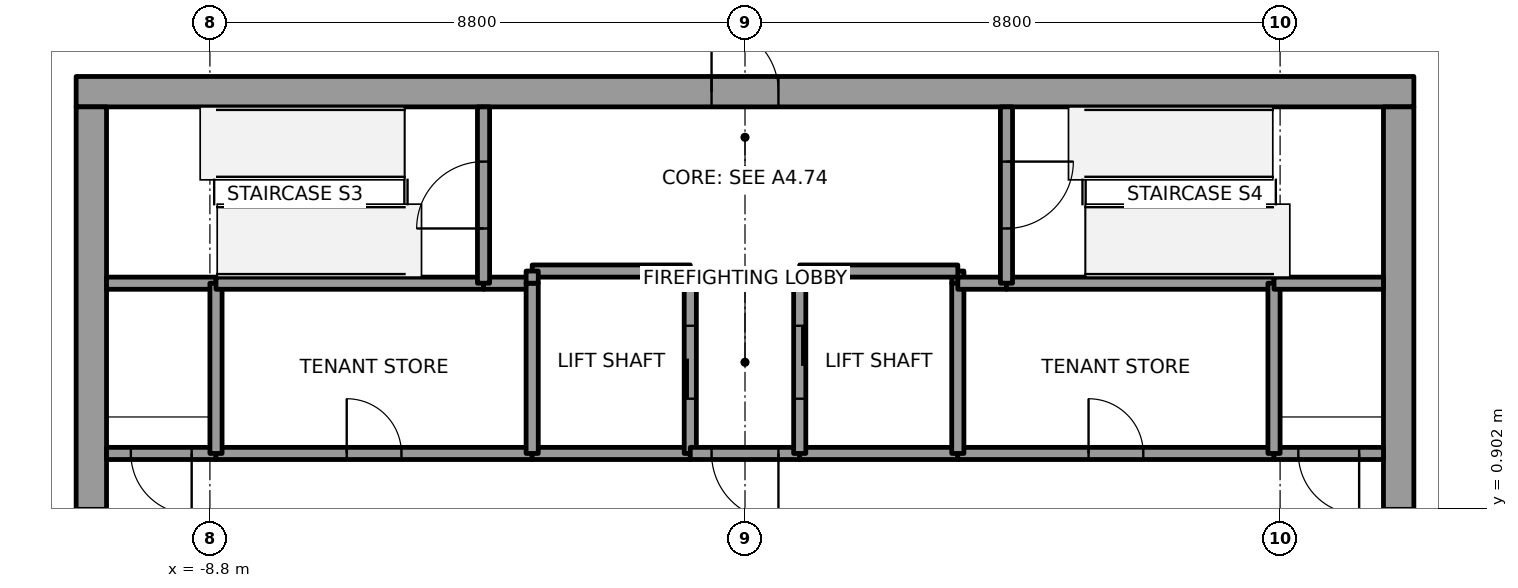
"""IFC4 building model, lengths in metres.
Left out: names, types, materials, properties, quantities, classifications, styles, units other than length and angle.
Written with IfcOpenShell. Run it as: python <this file> out.ifc"""

import sys

from ifc_helpers import new_model, si_unit, direction, frame, frame_2d, origin, place, context, subcontext, project, spatial, rectangle, extrude, element, fill, save


model = new_model("IFC4")
c1 = context("Model", 3, precision=1e-05, world=origin(), true_north=direction((0.0, 1.0)))
c2 = subcontext(c1, "Body", "Model", "MODEL_VIEW")
j1 = project(units=[si_unit("LENGTHUNIT", "METRE"), si_unit("PLANEANGLEUNIT", "RADIAN")], contexts=[c1])
p1 = place(None, origin())
s1 = spatial("IfcSite", under=j1, at=p1, CompositionType="ELEMENT")
p2 = place(p1, origin())
s2 = spatial("IfcBuilding", under=s1, at=p2, CompositionType="ELEMENT")
p3 = place(p2, frame((0.0, 0.0, 315.0)))
s3 = spatial("IfcBuildingStorey", under=s2, at=p3, CompositionType="ELEMENT", Elevation=315.0)
p4 = place(p3, frame((-11.0, 7.75, 0.0), z_axis=(0.0, 0.0, 1.0), x_axis=(1.0, 0.0, 0.0)))
e1 = element("IfcWall", 1, at=p4, inside=s3, PredefinedType="SHEAR", context=c2, shape_type="SweptSolid", body=[
    extrude(rectangle(XDim=22.0, YDim=0.5, at=frame_2d((11.0, 0.0))), origin(), (0.0, 0.0, 1.0), 4.0),
])
p5 = place(p4, frame((10.45, 0.0, 0.0)))
e2 = element("IfcOpeningElement", 2, at=p5, cuts=e1, PredefinedType="OPENING", context=c2, shape_type="SweptSolid", body=[
    extrude(rectangle(XDim=1.1, YDim=2.1, at=frame_2d((0.55, 1.05))), frame((0.0, 0.25, 0.0), z_axis=(0.0, -1.0, 0.0), x_axis=(1.0, 0.0, 0.0)), (0.0, 0.0, 1.0), 0.5),
])
p6 = place(p3, frame((-10.75, -7.5, 0.0), z_axis=(0.0, 0.0, 1.0), x_axis=(0.0, 1.0, 0.0)))
e3 = element("IfcWall", 3, at=p6, inside=s3, PredefinedType="SHEAR", context=c2, shape_type="SweptSolid", body=[
    extrude(rectangle(XDim=15.0, YDim=0.5, at=frame_2d((7.5, 0.0))), origin(), (0.0, 0.0, 1.0), 4.0),
])
p7 = place(p6, frame((6.6, 0.0, 0.0)))
e4 = element("IfcOpeningElement", 4, at=p7, cuts=e3, PredefinedType="OPENING", context=c2, shape_type="SweptSolid", body=[
    extrude(rectangle(XDim=1.8, YDim=2.1, at=frame_2d((0.9, 1.05))), frame((0.0, 0.25, 0.0), z_axis=(0.0, -1.0, 0.0), x_axis=(1.0, 0.0, 0.0)), (0.0, 0.0, 1.0), 0.5),
])
p8 = place(p3, frame((10.75, -7.5, 0.0), z_axis=(0.0, 0.0, 1.0), x_axis=(0.0, 1.0, 0.0)))
e5 = element("IfcWall", 5, at=p8, inside=s3, PredefinedType="SHEAR", context=c2, shape_type="SweptSolid", body=[
    extrude(rectangle(XDim=15.0, YDim=0.5, at=frame_2d((7.5, 0.0))), origin(), (0.0, 0.0, 1.0), 4.0),
])
p9 = place(p8, frame((6.6, 0.0, 0.0)))
e6 = element("IfcOpeningElement", 6, at=p9, cuts=e5, PredefinedType="OPENING", context=c2, shape_type="SweptSolid", body=[
    extrude(rectangle(XDim=1.8, YDim=2.1, at=frame_2d((0.9, 1.05))), frame((0.0, 0.25, 0.0), z_axis=(0.0, -1.0, 0.0), x_axis=(1.0, 0.0, 0.0)), (0.0, 0.0, 1.0), 0.5),
])
p10 = place(p3, frame((-8.7, 1.8, 0.0), z_axis=(0.0, 0.0, 1.0), x_axis=(-1.0, 0.0, 0.0)))
e7 = element("IfcWall", 7, at=p10, inside=s3, PredefinedType="SOLIDWALL", context=c2, shape_type="SweptSolid", body=[
    extrude(rectangle(XDim=1.8, YDim=0.2, at=frame_2d((0.9, 0.0))), origin(), (0.0, 0.0, 1.0), 3.85),
])
p11 = place(p10, frame((0.4, 0.0, 0.0)))
e8 = element("IfcOpeningElement", 8, at=p11, cuts=e7, PredefinedType="OPENING", context=c2, shape_type="SweptSolid", body=[
    extrude(rectangle(XDim=1.0, YDim=2.1, at=frame_2d((0.5, 1.05))), frame((0.0, 0.1, 0.0), z_axis=(0.0, -1.0, 0.0), x_axis=(1.0, 0.0, 0.0)), (0.0, 0.0, 1.0), 0.2),
])
p12 = place(p3, frame((-8.7, 4.6, 0.0), z_axis=(0.0, 0.0, 1.0), x_axis=(-1.0, 0.0, 0.0)))
e9 = element("IfcWall", 9, at=p12, inside=s3, PredefinedType="SOLIDWALL", context=c2, shape_type="SweptSolid", body=[
    extrude(rectangle(XDim=1.8, YDim=0.2, at=frame_2d((0.9, 0.0))), origin(), (0.0, 0.0, 1.0), 3.85),
])
p13 = place(p3, frame((-8.7, 1.8, 0.0), z_axis=(0.0, 0.0, 1.0), x_axis=(1.0, 0.0, 0.0)))
e10 = element("IfcWall", 10, at=p13, inside=s3, PredefinedType="SOLIDWALL", context=c2, shape_type="SweptSolid", body=[
    extrude(rectangle(XDim=5.2, YDim=0.2, at=frame_2d((2.6, 0.0))), origin(), (0.0, 0.0, 1.0), 3.85),
])
p14 = place(p13, frame((2.15, 0.0, 0.0)))
e11 = element("IfcOpeningElement", 11, at=p14, cuts=e10, PredefinedType="OPENING", context=c2, shape_type="SweptSolid", body=[
    extrude(rectangle(XDim=0.9, YDim=2.1, at=frame_2d((0.45, 1.05))), frame((0.0, 0.1, 0.0), z_axis=(0.0, -1.0, 0.0), x_axis=(1.0, 0.0, 0.0)), (0.0, 0.0, 1.0), 0.2),
])
p15 = place(p3, frame((-8.7, 4.6, 0.0), z_axis=(0.0, 0.0, 1.0), x_axis=(0.0, -1.0, 0.0)))
e12 = element("IfcWall", 12, at=p15, inside=s3, PredefinedType="SOLIDWALL", context=c2, shape_type="SweptSolid", body=[
    extrude(rectangle(XDim=2.8, YDim=0.2, at=frame_2d((1.4, 0.0))), origin(), (0.0, 0.0, 1.0), 3.85),
])
p16 = place(p3, frame((-4.3, 4.6, 0.0), z_axis=(0.0, 0.0, 1.0), x_axis=(-1.0, 0.0, 0.0)))
e13 = element("IfcWall", 13, at=p16, inside=s3, PredefinedType="SOLIDWALL", context=c2, shape_type="SweptSolid", body=[
    extrude(rectangle(XDim=4.4, YDim=0.2, at=frame_2d((2.2, 0.0))), origin(), (0.0, 0.0, 1.0), 3.85),
])
p17 = place(p3, frame((-3.5, 4.6, 0.0), z_axis=(0.0, 0.0, 1.0), x_axis=(-1.0, 0.0, 0.0)))
e14 = element("IfcWall", 14, at=p17, inside=s3, PredefinedType="SOLIDWALL", context=c2, shape_type="SweptSolid", body=[
    extrude(rectangle(XDim=0.8, YDim=0.2, at=frame_2d((0.4, 0.0))), origin(), (0.0, 0.0, 1.0), 3.85),
])
p18 = place(p3, frame((-4.3, 4.6, 0.0), z_axis=(0.0, 0.0, 1.0), x_axis=(0.0, 1.0, 0.0)))
e15 = element("IfcWall", 15, at=p18, inside=s3, PredefinedType="SOLIDWALL", context=c2, shape_type="SweptSolid", body=[
    extrude(rectangle(XDim=2.9, YDim=0.2, at=frame_2d((1.45, 0.0))), origin(), (0.0, 0.0, 1.0), 3.85),
])
p19 = place(p18, frame((0.9, 0.0, 0.0)))
e16 = element("IfcOpeningElement", 16, at=p19, cuts=e15, PredefinedType="OPENING", context=c2, shape_type="SweptSolid", body=[
    extrude(rectangle(XDim=1.1, YDim=2.1, at=frame_2d((0.55, 1.05))), frame((0.0, 0.1, 0.0), z_axis=(0.0, -1.0, 0.0), x_axis=(1.0, 0.0, 0.0)), (0.0, 0.0, 1.0), 0.2),
])
p20 = place(p3, frame((-0.9, 1.8, 0.0), z_axis=(0.0, 0.0, 1.0), x_axis=(-1.0, 0.0, 0.0)))
e17 = element("IfcWall", 17, at=p20, inside=s3, PredefinedType="SOLIDWALL", context=c2, shape_type="SweptSolid", body=[
    extrude(rectangle(XDim=2.6, YDim=0.2, at=frame_2d((1.3, 0.0))), origin(), (0.0, 0.0, 1.0), 3.85),
])
p21 = place(p3, frame((-3.5, 1.8, 0.0), z_axis=(0.0, 0.0, 1.0), x_axis=(0.0, 1.0, 0.0)))
e18 = element("IfcWall", 18, at=p21, inside=s3, PredefinedType="SOLIDWALL", context=c2, shape_type="SweptSolid", body=[
    extrude(rectangle(XDim=2.8, YDim=0.2, at=frame_2d((1.4, 0.0))), origin(), (0.0, 0.0, 1.0), 3.85),
])
p22 = place(p3, frame((-0.9, 1.8, 0.0), z_axis=(0.0, 0.0, 1.0), x_axis=(0.0, 1.0, 0.0)))
e19 = element("IfcWall", 19, at=p22, inside=s3, PredefinedType="SOLIDWALL", context=c2, shape_type="SweptSolid", body=[
    extrude(rectangle(XDim=3.0, YDim=0.2, at=frame_2d((1.5, 0.0))), origin(), (0.0, 0.0, 1.0), 3.85),
])
p23 = place(p22, frame((0.9, 0.0, 0.0)))
e20 = element("IfcOpeningElement", 20, at=p23, cuts=e19, PredefinedType="OPENING", context=c2, shape_type="SweptSolid", body=[
    extrude(rectangle(XDim=1.2, YDim=2.1, at=frame_2d((0.6, 1.05))), frame((0.0, 0.1, 0.0), z_axis=(0.0, -1.0, 0.0), x_axis=(1.0, 0.0, 0.0)), (0.0, 0.0, 1.0), 0.2),
])
p24 = place(p3, frame((-0.9, 4.8, 0.0), z_axis=(0.0, 0.0, 1.0), x_axis=(-1.0, 0.0, 0.0)))
e21 = element("IfcWall", 21, at=p24, inside=s3, PredefinedType="SOLIDWALL", context=c2, shape_type="SweptSolid", body=[
    extrude(rectangle(XDim=2.6, YDim=0.2, at=frame_2d((1.3, 0.0))), origin(), (0.0, 0.0, 1.0), 3.85),
])
p25 = place(p3, frame((-3.5, 4.8, 0.0), z_axis=(0.0, 0.0, 1.0), x_axis=(0.0, -1.0, 0.0)))
e22 = element("IfcWall", 22, at=p25, inside=s3, PredefinedType="SOLIDWALL", context=c2, shape_type="SweptSolid", body=[
    extrude(rectangle(XDim=0.2, YDim=0.2, at=frame_2d((0.1, 0.0))), origin(), (0.0, 0.0, 1.0), 3.85),
])
p26 = place(p3, frame((0.9, 1.8, 0.0), z_axis=(0.0, 0.0, 1.0), x_axis=(-1.0, 0.0, 0.0)))
e23 = element("IfcWall", 23, at=p26, inside=s3, PredefinedType="SOLIDWALL", context=c2, shape_type="SweptSolid", body=[
    extrude(rectangle(XDim=1.8, YDim=0.2, at=frame_2d((0.9, 0.0))), origin(), (0.0, 0.0, 1.0), 3.85),
])
p27 = place(p26, frame((0.35, 0.0, 0.0)))
e24 = element("IfcOpeningElement", 24, at=p27, cuts=e23, PredefinedType="OPENING", context=c2, shape_type="SweptSolid", body=[
    extrude(rectangle(XDim=1.1, YDim=2.1, at=frame_2d((0.55, 1.05))), frame((0.0, 0.1, 0.0), z_axis=(0.0, -1.0, 0.0), x_axis=(1.0, 0.0, 0.0)), (0.0, 0.0, 1.0), 0.2),
])
p28 = place(p3, frame((3.5, 1.8, 0.0), z_axis=(0.0, 0.0, 1.0), x_axis=(-1.0, 0.0, 0.0)))
e25 = element("IfcWall", 25, at=p28, inside=s3, PredefinedType="SOLIDWALL", context=c2, shape_type="SweptSolid", body=[
    extrude(rectangle(XDim=2.6, YDim=0.2, at=frame_2d((1.3, 0.0))), origin(), (0.0, 0.0, 1.0), 3.85),
])
p29 = place(p3, frame((3.5, 4.6, 0.0), z_axis=(0.0, 0.0, 1.0), x_axis=(0.0, 1.0, 0.0)))
e26 = element("IfcWall", 26, at=p29, inside=s3, PredefinedType="SOLIDWALL", context=c2, shape_type="SweptSolid", body=[
    extrude(rectangle(XDim=0.2, YDim=0.2, at=frame_2d((0.1, 0.0))), origin(), (0.0, 0.0, 1.0), 3.85),
])
p30 = place(p3, frame((3.5, 4.8, 0.0), z_axis=(0.0, 0.0, 1.0), x_axis=(-1.0, 0.0, 0.0)))
e27 = element("IfcWall", 27, at=p30, inside=s3, PredefinedType="SOLIDWALL", context=c2, shape_type="SweptSolid", body=[
    extrude(rectangle(XDim=2.6, YDim=0.2, at=frame_2d((1.3, 0.0))), origin(), (0.0, 0.0, 1.0), 3.85),
])
p31 = place(p3, frame((0.9, 4.8, 0.0), z_axis=(0.0, 0.0, 1.0), x_axis=(0.0, -1.0, 0.0)))
e28 = element("IfcWall", 28, at=p31, inside=s3, PredefinedType="SOLIDWALL", context=c2, shape_type="SweptSolid", body=[
    extrude(rectangle(XDim=3.0, YDim=0.2, at=frame_2d((1.5, 0.0))), origin(), (0.0, 0.0, 1.0), 3.85),
])
p32 = place(p31, frame((0.9, 0.0, 0.0)))
e29 = element("IfcOpeningElement", 29, at=p32, cuts=e28, PredefinedType="OPENING", context=c2, shape_type="SweptSolid", body=[
    extrude(rectangle(XDim=1.2, YDim=2.1, at=frame_2d((0.6, 1.05))), frame((0.0, 0.1, 0.0), z_axis=(0.0, -1.0, 0.0), x_axis=(1.0, 0.0, 0.0)), (0.0, 0.0, 1.0), 0.2),
])
p33 = place(p3, frame((3.5, 1.8, 0.0), z_axis=(0.0, 0.0, 1.0), x_axis=(1.0, 0.0, 0.0)))
e30 = element("IfcWall", 30, at=p33, inside=s3, PredefinedType="SOLIDWALL", context=c2, shape_type="SweptSolid", body=[
    extrude(rectangle(XDim=5.2, YDim=0.2, at=frame_2d((2.6, 0.0))), origin(), (0.0, 0.0, 1.0), 3.85),
])
p34 = place(p33, frame((2.15, 0.0, 0.0)))
e31 = element("IfcOpeningElement", 31, at=p34, cuts=e30, PredefinedType="OPENING", context=c2, shape_type="SweptSolid", body=[
    extrude(rectangle(XDim=0.9, YDim=2.1, at=frame_2d((0.45, 1.05))), frame((0.0, 0.1, 0.0), z_axis=(0.0, -1.0, 0.0), x_axis=(1.0, 0.0, 0.0)), (0.0, 0.0, 1.0), 0.2),
])
p35 = place(p3, frame((3.5, 4.6, 0.0), z_axis=(0.0, 0.0, 1.0), x_axis=(0.0, -1.0, 0.0)))
e32 = element("IfcWall", 32, at=p35, inside=s3, PredefinedType="SOLIDWALL", context=c2, shape_type="SweptSolid", body=[
    extrude(rectangle(XDim=2.8, YDim=0.2, at=frame_2d((1.4, 0.0))), origin(), (0.0, 0.0, 1.0), 3.85),
])
p36 = place(p3, frame((4.3, 4.6, 0.0), z_axis=(0.0, 0.0, 1.0), x_axis=(-1.0, 0.0, 0.0)))
e33 = element("IfcWall", 33, at=p36, inside=s3, PredefinedType="SOLIDWALL", context=c2, shape_type="SweptSolid", body=[
    extrude(rectangle(XDim=0.8, YDim=0.2, at=frame_2d((0.4, 0.0))), origin(), (0.0, 0.0, 1.0), 3.85),
])
p37 = place(p3, frame((8.7, 4.6, 0.0), z_axis=(0.0, 0.0, 1.0), x_axis=(-1.0, 0.0, 0.0)))
e34 = element("IfcWall", 34, at=p37, inside=s3, PredefinedType="SOLIDWALL", context=c2, shape_type="SweptSolid", body=[
    extrude(rectangle(XDim=4.4, YDim=0.2, at=frame_2d((2.2, 0.0))), origin(), (0.0, 0.0, 1.0), 3.85),
])
p38 = place(p3, frame((4.3, 7.5, 0.0), z_axis=(0.0, 0.0, 1.0), x_axis=(0.0, -1.0, 0.0)))
e35 = element("IfcWall", 35, at=p38, inside=s3, PredefinedType="SOLIDWALL", context=c2, shape_type="SweptSolid", body=[
    extrude(rectangle(XDim=2.9, YDim=0.2, at=frame_2d((1.45, 0.0))), origin(), (0.0, 0.0, 1.0), 3.85),
])
p39 = place(p38, frame((0.9, 0.0, 0.0)))
e36 = element("IfcOpeningElement", 36, at=p39, cuts=e35, PredefinedType="OPENING", context=c2, shape_type="SweptSolid", body=[
    extrude(rectangle(XDim=1.1, YDim=2.1, at=frame_2d((0.55, 1.05))), frame((0.0, 0.1, 0.0), z_axis=(0.0, -1.0, 0.0), x_axis=(1.0, 0.0, 0.0)), (0.0, 0.0, 1.0), 0.2),
])
p40 = place(p3, frame((10.5, 1.8, 0.0), z_axis=(0.0, 0.0, 1.0), x_axis=(-1.0, 0.0, 0.0)))
e37 = element("IfcWall", 37, at=p40, inside=s3, PredefinedType="SOLIDWALL", context=c2, shape_type="SweptSolid", body=[
    extrude(rectangle(XDim=1.8, YDim=0.2, at=frame_2d((0.9, 0.0))), origin(), (0.0, 0.0, 1.0), 3.85),
])
p41 = place(p40, frame((0.4, 0.0, 0.0)))
e38 = element("IfcOpeningElement", 38, at=p41, cuts=e37, PredefinedType="OPENING", context=c2, shape_type="SweptSolid", body=[
    extrude(rectangle(XDim=1.0, YDim=2.1, at=frame_2d((0.5, 1.05))), frame((0.0, 0.1, 0.0), z_axis=(0.0, -1.0, 0.0), x_axis=(1.0, 0.0, 0.0)), (0.0, 0.0, 1.0), 0.2),
])
p42 = place(p3, frame((8.7, 1.8, 0.0), z_axis=(0.0, 0.0, 1.0), x_axis=(0.0, 1.0, 0.0)))
e39 = element("IfcWall", 39, at=p42, inside=s3, PredefinedType="SOLIDWALL", context=c2, shape_type="SweptSolid", body=[
    extrude(rectangle(XDim=2.8, YDim=0.2, at=frame_2d((1.4, 0.0))), origin(), (0.0, 0.0, 1.0), 3.85),
])
p43 = place(p3, frame((10.5, 4.6, 0.0), z_axis=(0.0, 0.0, 1.0), x_axis=(-1.0, 0.0, 0.0)))
e40 = element("IfcWall", 40, at=p43, inside=s3, PredefinedType="SOLIDWALL", context=c2, shape_type="SweptSolid", body=[
    extrude(rectangle(XDim=1.8, YDim=0.2, at=frame_2d((0.9, 0.0))), origin(), (0.0, 0.0, 1.0), 3.85),
])
p44 = place(p23, origin())
e41 = element("IfcDoor", 41, at=p44, inside=s3, OperationType="SLIDING_TO_LEFT", PredefinedType="DOOR", context=c2, shape_type="SweptSolid", body=[
    extrude(rectangle(XDim=1.2, YDim=2.1, at=frame_2d((0.6, 1.05))), frame((0.0, 0.025, 0.0), z_axis=(0.0, -1.0, 0.0), x_axis=(1.0, 0.0, 0.0)), (0.0, 0.0, 1.0), 0.05),
])
fill(e20, e41)
p45 = place(p32, origin())
e42 = element("IfcDoor", 42, at=p45, inside=s3, OperationType="SLIDING_TO_LEFT", PredefinedType="DOOR", context=c2, shape_type="SweptSolid", body=[
    extrude(rectangle(XDim=1.2, YDim=2.1, at=frame_2d((0.6, 1.05))), frame((0.0, 0.025, 0.0), z_axis=(0.0, -1.0, 0.0), x_axis=(1.0, 0.0, 0.0)), (0.0, 0.0, 1.0), 0.05),
])
fill(e29, e42)
p46 = place(p27, origin())
e43 = element("IfcDoor", 43, at=p46, inside=s3, OperationType="SINGLE_SWING_RIGHT", PredefinedType="DOOR", context=c2, shape_type="SweptSolid", body=[
    extrude(rectangle(XDim=1.1, YDim=2.1, at=frame_2d((0.55, 1.05))), frame((0.0, 0.025, 0.0), z_axis=(0.0, -1.0, 0.0), x_axis=(1.0, 0.0, 0.0)), (0.0, 0.0, 1.0), 0.05),
])
fill(e24, e43)
p47 = place(p11, origin())
e44 = element("IfcDoor", 44, at=p47, inside=s3, OperationType="SINGLE_SWING_LEFT", PredefinedType="DOOR", context=c2, shape_type="SweptSolid", body=[
    extrude(rectangle(XDim=1.0, YDim=2.1, at=frame_2d((0.5, 1.05))), frame((0.0, 0.025, 0.0), z_axis=(0.0, -1.0, 0.0), x_axis=(1.0, 0.0, 0.0)), (0.0, 0.0, 1.0), 0.05),
])
fill(e8, e44)
p48 = place(p41, origin())
e45 = element("IfcDoor", 45, at=p48, inside=s3, OperationType="SINGLE_SWING_LEFT", PredefinedType="DOOR", context=c2, shape_type="SweptSolid", body=[
    extrude(rectangle(XDim=1.0, YDim=2.1, at=frame_2d((0.5, 1.05))), frame((0.0, 0.025, 0.0), z_axis=(0.0, -1.0, 0.0), x_axis=(1.0, 0.0, 0.0)), (0.0, 0.0, 1.0), 0.05),
])
fill(e38, e45)
p49 = place(p19, origin())
e46 = element("IfcDoor", 46, at=p49, inside=s3, OperationType="SINGLE_SWING_RIGHT", PredefinedType="DOOR", context=c2, shape_type="SweptSolid", body=[
    extrude(rectangle(XDim=1.1, YDim=2.1, at=frame_2d((0.55, 1.05))), frame((0.0, 0.025, 0.0), z_axis=(0.0, -1.0, 0.0), x_axis=(1.0, 0.0, 0.0)), (0.0, 0.0, 1.0), 0.05),
])
fill(e16, e46)
p50 = place(p39, origin())
e47 = element("IfcDoor", 47, at=p50, inside=s3, OperationType="SINGLE_SWING_LEFT", PredefinedType="DOOR", context=c2, shape_type="SweptSolid", body=[
    extrude(rectangle(XDim=1.1, YDim=2.1, at=frame_2d((0.55, 1.05))), frame((0.0, 0.025, 0.0), z_axis=(0.0, -1.0, 0.0), x_axis=(1.0, 0.0, 0.0)), (0.0, 0.0, 1.0), 0.05),
])
fill(e36, e47)
p51 = place(p34, origin())
e48 = element("IfcDoor", 48, at=p51, inside=s3, OperationType="SINGLE_SWING_LEFT", PredefinedType="DOOR", context=c2, shape_type="SweptSolid", body=[
    extrude(rectangle(XDim=0.9, YDim=2.1, at=frame_2d((0.45, 1.05))), frame((0.0, 0.025, 0.0), z_axis=(0.0, -1.0, 0.0), x_axis=(1.0, 0.0, 0.0)), (0.0, 0.0, 1.0), 0.05),
])
fill(e31, e48)
p52 = place(p14, origin())
e49 = element("IfcDoor", 49, at=p52, inside=s3, OperationType="SINGLE_SWING_RIGHT", PredefinedType="DOOR", context=c2, shape_type="SweptSolid", body=[
    extrude(rectangle(XDim=0.9, YDim=2.1, at=frame_2d((0.45, 1.05))), frame((0.0, 0.025, 0.0), z_axis=(0.0, -1.0, 0.0), x_axis=(1.0, 0.0, 0.0)), (0.0, 0.0, 1.0), 0.05),
])
fill(e11, e49)
p53 = place(p7, origin())
e50 = element("IfcDoor", 50, at=p53, inside=s3, OperationType="DOUBLE_DOOR_SINGLE_SWING", PredefinedType="DOOR", context=c2, shape_type="SweptSolid", body=[
    extrude(rectangle(XDim=1.8, YDim=2.1, at=frame_2d((0.9, 1.05))), frame((0.0, 0.025, 0.0), z_axis=(0.0, -1.0, 0.0), x_axis=(1.0, 0.0, 0.0)), (0.0, 0.0, 1.0), 0.05),
])
fill(e4, e50)
p54 = place(p9, origin())
e51 = element("IfcDoor", 51, at=p54, inside=s3, OperationType="DOUBLE_DOOR_SINGLE_SWING", PredefinedType="DOOR", context=c2, shape_type="SweptSolid", body=[
    extrude(rectangle(XDim=1.8, YDim=2.1, at=frame_2d((0.9, 1.05))), frame((0.0, 0.025, 0.0), z_axis=(0.0, -1.0, 0.0), x_axis=(1.0, 0.0, 0.0)), (0.0, 0.0, 1.0), 0.05),
])
fill(e6, e51)
p55 = place(p5, origin())
e52 = element("IfcDoor", 52, at=p55, inside=s3, OperationType="SINGLE_SWING_LEFT", PredefinedType="DOOR", context=c2, shape_type="SweptSolid", body=[
    extrude(rectangle(XDim=1.1, YDim=2.1, at=frame_2d((0.55, 1.05))), frame((0.0, 0.025, 0.0), z_axis=(0.0, -1.0, 0.0), x_axis=(1.0, 0.0, 0.0)), (0.0, 0.0, 1.0), 0.05),
])
fill(e2, e52)
save(model, sys.argv[1])
